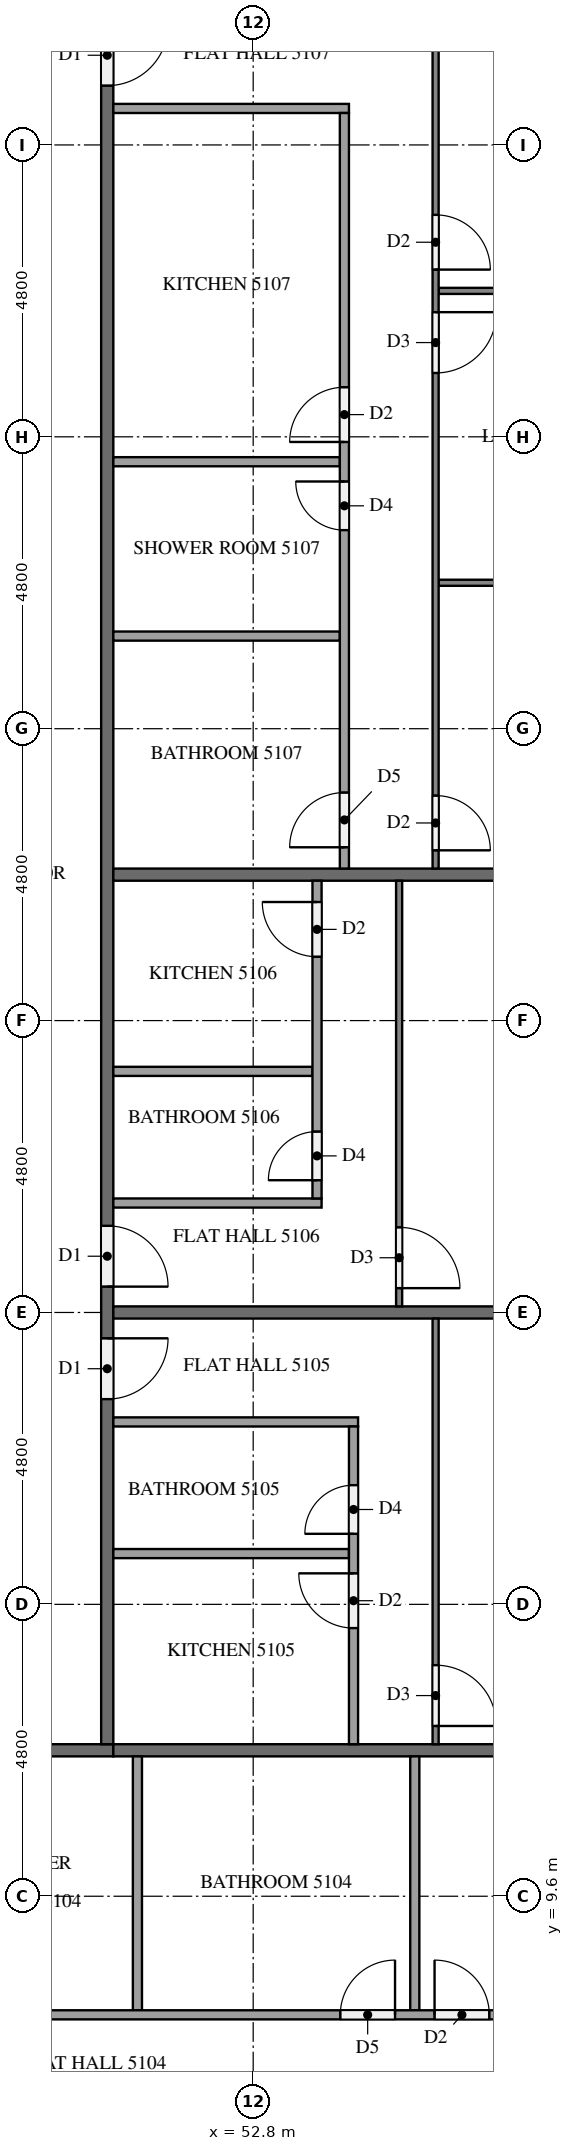
"""IFC4 building model, lengths in metres.
Left out: names, types, materials, properties, quantities, classifications, styles, units other than length and angle.
Written with IfcOpenShell. Run it as: python <this file> out.ifc"""

import sys

from ifc_helpers import new_model, si_unit, direction, frame, frame_2d, origin, place, context, subcontext, project, spatial, rectangle, extrude, element, fill, save


model = new_model("IFC4")
c1 = context("Model", 3, precision=1e-05, world=origin(), true_north=direction((0.0, 1.0)))
c2 = subcontext(c1, "Body", "Model", "MODEL_VIEW")
j1 = project(units=[si_unit("LENGTHUNIT", "METRE"), si_unit("PLANEANGLEUNIT", "RADIAN")], contexts=[c1])
p1 = place(None, origin())
s1 = spatial("IfcSite", under=j1, at=p1, CompositionType="ELEMENT")
p2 = place(p1, origin())
s2 = spatial("IfcBuilding", under=s1, at=p2, CompositionType="ELEMENT")
p3 = place(p2, frame((0.0, 0.0, 196.4)))
s3 = spatial("IfcBuildingStorey", under=s2, at=p3, CompositionType="ELEMENT", Elevation=196.4)
p4 = place(p3, frame((50.5, 12.0, 0.0), z_axis=(0.0, 0.0, 1.0), x_axis=(-1.0, 0.0, 0.0)))
e1 = element("IfcWall", 1, at=p4, inside=s3, PredefinedType="PARTITIONING", context=c2, shape_type="SweptSolid", body=[
    extrude(rectangle(XDim=38.6, YDim=0.2, at=frame_2d((19.3, 0.0))), origin(), (0.0, 0.0, 1.0), 3.2),
])
p5 = place(p4, frame((31.725, 0.0, 0.0)))
e2 = element("IfcOpeningElement", 2, at=p5, cuts=e1, PredefinedType="OPENING", context=c2, shape_type="SweptSolid", body=[
    extrude(rectangle(XDim=1.0, YDim=2.1, at=frame_2d((0.5, 1.05))), frame((0.0, 0.11, 0.0), z_axis=(0.0, -1.0, 0.0), x_axis=(1.0, 0.0, 0.0)), (0.0, 0.0, 1.0), 0.22),
])
p6 = place(p4, frame((19.725, 0.0, 0.0)))
e3 = element("IfcOpeningElement", 3, at=p6, cuts=e1, PredefinedType="OPENING", context=c2, shape_type="SweptSolid", body=[
    extrude(rectangle(XDim=1.0, YDim=2.1, at=frame_2d((0.5, 1.05))), frame((0.0, 0.11, 0.0), z_axis=(0.0, -1.0, 0.0), x_axis=(1.0, 0.0, 0.0)), (0.0, 0.0, 1.0), 0.22),
])
p7 = place(p4, frame((17.875, 0.0, 0.0)))
e4 = element("IfcOpeningElement", 4, at=p7, cuts=e1, PredefinedType="OPENING", context=c2, shape_type="SweptSolid", body=[
    extrude(rectangle(XDim=1.0, YDim=2.1, at=frame_2d((0.5, 1.05))), frame((0.0, 0.11, 0.0), z_axis=(0.0, -1.0, 0.0), x_axis=(1.0, 0.0, 0.0)), (0.0, 0.0, 1.0), 0.22),
])
p8 = place(p4, frame((3.475, 0.0, 0.0)))
e5 = element("IfcOpeningElement", 5, at=p8, cuts=e1, PredefinedType="OPENING", context=c2, shape_type="SweptSolid", body=[
    extrude(rectangle(XDim=1.0, YDim=2.1, at=frame_2d((0.5, 1.05))), frame((0.0, 0.11, 0.0), z_axis=(0.0, -1.0, 0.0), x_axis=(1.0, 0.0, 0.0)), (0.0, 0.0, 1.0), 0.22),
])
p9 = place(p3, frame((50.4, 40.7, 0.0), z_axis=(0.0, 0.0, 1.0), x_axis=(0.0, -1.0, 0.0)))
e6 = element("IfcWall", 6, at=p9, inside=s3, PredefinedType="PARTITIONING", context=c2, shape_type="SweptSolid", body=[
    extrude(rectangle(XDim=28.6, YDim=0.2, at=frame_2d((14.3, 0.0))), origin(), (0.0, 0.0, 1.0), 3.2),
])
p10 = place(p9, frame((21.925, 0.0, 0.0)))
e7 = element("IfcOpeningElement", 7, at=p10, cuts=e6, PredefinedType="OPENING", context=c2, shape_type="SweptSolid", body=[
    extrude(rectangle(XDim=1.0, YDim=2.1, at=frame_2d((0.5, 1.05))), frame((0.0, 0.11, 0.0), z_axis=(0.0, -1.0, 0.0), x_axis=(1.0, 0.0, 0.0)), (0.0, 0.0, 1.0), 0.22),
])
p11 = place(p9, frame((20.075, 0.0, 0.0)))
e8 = element("IfcOpeningElement", 8, at=p11, cuts=e6, PredefinedType="OPENING", context=c2, shape_type="SweptSolid", body=[
    extrude(rectangle(XDim=1.0, YDim=2.1, at=frame_2d((0.5, 1.05))), frame((0.0, 0.11, 0.0), z_axis=(0.0, -1.0, 0.0), x_axis=(1.0, 0.0, 0.0)), (0.0, 0.0, 1.0), 0.22),
])
p12 = place(p9, frame((0.325, 0.0, 0.0)))
e9 = element("IfcOpeningElement", 9, at=p12, cuts=e6, PredefinedType="OPENING", context=c2, shape_type="SweptSolid", body=[
    extrude(rectangle(XDim=1.0, YDim=2.1, at=frame_2d((0.5, 1.05))), frame((0.0, 0.11, 0.0), z_axis=(0.0, -1.0, 0.0), x_axis=(1.0, 0.0, 0.0)), (0.0, 0.0, 1.0), 0.22),
])
for number, where, z_axis, x_axis in (
    (10, (50.5, 12.0, 0.0), (0.0, 0.0, 1.0), (1.0, 0.0, 0.0)),
    (11, (50.5, 19.2, 0.0), (0.0, 0.0, 1.0), (1.0, 0.0, 0.0)),
    (12, (50.5, 26.4, 0.0), (0.0, 0.0, 1.0), (1.0, 0.0, 0.0)),
):
    element("IfcWall", number, at=place(p3, frame(where, z_axis=z_axis, x_axis=x_axis)), inside=s3, PredefinedType="PARTITIONING", context=c2, shape_type="SweptSolid", body=[
        extrude(rectangle(XDim=11.8, YDim=0.2, at=frame_2d((5.9, 0.0))), origin(), (0.0, 0.0, 1.0), 3.2),
    ])
for number, where, z_axis, x_axis in (
    (13, (50.896, 11.9, 0.0), (0.0, 0.0, 1.0), (0.0, -1.0, 0.0)),
    (14, (55.458, 11.9, 0.0), (0.0, 0.0, 1.0), (0.0, -1.0, 0.0)),
):
    element("IfcWall", number, at=place(p3, frame(where, z_axis=z_axis, x_axis=x_axis)), inside=s3, PredefinedType="PARTITIONING", context=c2, shape_type="SweptSolid", body=[
        extrude(rectangle(XDim=4.175, YDim=0.15, at=frame_2d((2.087, 0.0))), origin(), (0.0, 0.0, 1.0), 3.2),
    ])
p13 = place(p3, frame((47.475, 7.65, 0.0), z_axis=(0.0, 0.0, 1.0), x_axis=(1.0, 0.0, 0.0)))
e15 = element("IfcWall", 15, at=p13, inside=s3, PredefinedType="PARTITIONING", context=c2, shape_type="SweptSolid", body=[
    extrude(rectangle(XDim=14.825, YDim=0.15, at=frame_2d((7.413, 0.0))), origin(), (0.0, 0.0, 1.0), 3.2),
])
p14 = place(p13, frame((0.3, 0.0, 0.0)))
e16 = element("IfcOpeningElement", 16, at=p14, cuts=e15, PredefinedType="OPENING", context=c2, shape_type="SweptSolid", body=[
    extrude(rectangle(XDim=0.8, YDim=2.1, at=frame_2d((0.4, 1.05))), frame((0.0, 0.085, 0.0), z_axis=(0.0, -1.0, 0.0), x_axis=(1.0, 0.0, 0.0)), (0.0, 0.0, 1.0), 0.17),
])
p15 = place(p13, frame((6.758, 0.0, 0.0)))
e17 = element("IfcOpeningElement", 17, at=p15, cuts=e15, PredefinedType="OPENING", context=c2, shape_type="SweptSolid", body=[
    extrude(rectangle(XDim=0.9, YDim=2.1, at=frame_2d((0.45, 1.05))), frame((0.0, 0.085, 0.0), z_axis=(0.0, -1.0, 0.0), x_axis=(1.0, 0.0, 0.0)), (0.0, 0.0, 1.0), 0.17),
])
p16 = place(p13, frame((8.308, 0.0, 0.0)))
e18 = element("IfcOpeningElement", 18, at=p16, cuts=e15, PredefinedType="OPENING", context=c2, shape_type="SweptSolid", body=[
    extrude(rectangle(XDim=0.9, YDim=2.1, at=frame_2d((0.45, 1.05))), frame((0.0, 0.085, 0.0), z_axis=(0.0, -1.0, 0.0), x_axis=(1.0, 0.0, 0.0)), (0.0, 0.0, 1.0), 0.17),
])
p17 = place(p3, frame((55.8, 19.1, 0.0), z_axis=(0.0, 0.0, 1.0), x_axis=(0.0, -1.0, 0.0)))
e19 = element("IfcWall", 19, at=p17, inside=s3, PredefinedType="PARTITIONING", context=c2, shape_type="SweptSolid", body=[
    extrude(rectangle(XDim=7.0, YDim=0.1, at=frame_2d((3.5, 0.0))), origin(), (0.0, 0.0, 1.0), 3.2),
])
p18 = place(p17, frame((5.7, 0.0, 0.0)))
e20 = element("IfcOpeningElement", 20, at=p18, cuts=e19, PredefinedType="OPENING", context=c2, shape_type="SweptSolid", body=[
    extrude(rectangle(XDim=1.0, YDim=2.1, at=frame_2d((0.5, 1.05))), frame((0.0, 0.06, 0.0), z_axis=(0.0, -1.0, 0.0), x_axis=(1.0, 0.0, 0.0)), (0.0, 0.0, 1.0), 0.12),
])
p19 = place(p3, frame((50.5, 15.235, 0.0), z_axis=(0.0, 0.0, 1.0), x_axis=(1.0, 0.0, 0.0)))
e21 = element("IfcWall", 21, at=p19, inside=s3, PredefinedType="PARTITIONING", context=c2, shape_type="SweptSolid", body=[
    extrude(rectangle(XDim=3.875, YDim=0.15, at=frame_2d((1.938, 0.0))), origin(), (0.0, 0.0, 1.0), 3.2),
])
p20 = place(p3, frame((50.5, 17.4, 0.0), z_axis=(0.0, 0.0, 1.0), x_axis=(1.0, 0.0, 0.0)))
e22 = element("IfcWall", 22, at=p20, inside=s3, PredefinedType="PARTITIONING", context=c2, shape_type="SweptSolid", body=[
    extrude(rectangle(XDim=4.025, YDim=0.15, at=frame_2d((2.012, 0.0))), origin(), (0.0, 0.0, 1.0), 3.2),
])
p21 = place(p3, frame((54.45, 12.1, 0.0), z_axis=(0.0, 0.0, 1.0), x_axis=(0.0, 1.0, 0.0)))
e23 = element("IfcWall", 23, at=p21, inside=s3, PredefinedType="PARTITIONING", context=c2, shape_type="SweptSolid", body=[
    extrude(rectangle(XDim=5.225, YDim=0.15, at=frame_2d((2.612, 0.0))), origin(), (0.0, 0.0, 1.0), 3.2),
])
p22 = place(p21, frame((3.46, 0.0, 0.0)))
e24 = element("IfcOpeningElement", 24, at=p22, cuts=e23, PredefinedType="OPENING", context=c2, shape_type="SweptSolid", body=[
    extrude(rectangle(XDim=0.8, YDim=2.1, at=frame_2d((0.4, 1.05))), frame((0.0, 0.085, 0.0), z_axis=(0.0, -1.0, 0.0), x_axis=(1.0, 0.0, 0.0)), (0.0, 0.0, 1.0), 0.17),
])
p23 = place(p21, frame((1.91, 0.0, 0.0)))
e25 = element("IfcOpeningElement", 25, at=p23, cuts=e23, PredefinedType="OPENING", context=c2, shape_type="SweptSolid", body=[
    extrude(rectangle(XDim=0.9, YDim=2.1, at=frame_2d((0.45, 1.05))), frame((0.0, 0.085, 0.0), z_axis=(0.0, -1.0, 0.0), x_axis=(1.0, 0.0, 0.0)), (0.0, 0.0, 1.0), 0.17),
])
p24 = place(p3, frame((55.2, 26.3, 0.0), z_axis=(0.0, 0.0, 1.0), x_axis=(0.0, -1.0, 0.0)))
e26 = element("IfcWall", 26, at=p24, inside=s3, PredefinedType="PARTITIONING", context=c2, shape_type="SweptSolid", body=[
    extrude(rectangle(XDim=7.0, YDim=0.1, at=frame_2d((3.5, 0.0))), origin(), (0.0, 0.0, 1.0), 3.2),
])
p25 = place(p24, frame((5.7, 0.0, 0.0)))
e27 = element("IfcOpeningElement", 27, at=p25, cuts=e26, PredefinedType="OPENING", context=c2, shape_type="SweptSolid", body=[
    extrude(rectangle(XDim=1.0, YDim=2.1, at=frame_2d((0.5, 1.05))), frame((0.0, 0.06, 0.0), z_axis=(0.0, -1.0, 0.0), x_axis=(1.0, 0.0, 0.0)), (0.0, 0.0, 1.0), 0.12),
])
p26 = place(p3, frame((50.5, 23.165, 0.0), z_axis=(0.0, 0.0, 1.0), x_axis=(1.0, 0.0, 0.0)))
e28 = element("IfcWall", 28, at=p26, inside=s3, PredefinedType="PARTITIONING", context=c2, shape_type="SweptSolid", body=[
    extrude(rectangle(XDim=3.275, YDim=0.15, at=frame_2d((1.637, 0.0))), origin(), (0.0, 0.0, 1.0), 3.2),
])
p27 = place(p3, frame((50.5, 21.0, 0.0), z_axis=(0.0, 0.0, 1.0), x_axis=(1.0, 0.0, 0.0)))
e29 = element("IfcWall", 29, at=p27, inside=s3, PredefinedType="PARTITIONING", context=c2, shape_type="SweptSolid", body=[
    extrude(rectangle(XDim=3.425, YDim=0.15, at=frame_2d((1.712, 0.0))), origin(), (0.0, 0.0, 1.0), 3.2),
])
p28 = place(p3, frame((53.85, 21.075, 0.0), z_axis=(0.0, 0.0, 1.0), x_axis=(0.0, 1.0, 0.0)))
e30 = element("IfcWall", 30, at=p28, inside=s3, PredefinedType="PARTITIONING", context=c2, shape_type="SweptSolid", body=[
    extrude(rectangle(XDim=5.225, YDim=0.15, at=frame_2d((2.613, 0.0))), origin(), (0.0, 0.0, 1.0), 3.2),
])
p29 = place(p28, frame((0.3, 0.0, 0.0)))
e31 = element("IfcOpeningElement", 31, at=p29, cuts=e30, PredefinedType="OPENING", context=c2, shape_type="SweptSolid", body=[
    extrude(rectangle(XDim=0.8, YDim=2.1, at=frame_2d((0.4, 1.05))), frame((0.0, 0.085, 0.0), z_axis=(0.0, -1.0, 0.0), x_axis=(1.0, 0.0, 0.0)), (0.0, 0.0, 1.0), 0.17),
])
p30 = place(p28, frame((3.975, 0.0, 0.0)))
e32 = element("IfcOpeningElement", 32, at=p30, cuts=e30, PredefinedType="OPENING", context=c2, shape_type="SweptSolid", body=[
    extrude(rectangle(XDim=0.9, YDim=2.1, at=frame_2d((0.45, 1.05))), frame((0.0, 0.085, 0.0), z_axis=(0.0, -1.0, 0.0), x_axis=(1.0, 0.0, 0.0)), (0.0, 0.0, 1.0), 0.17),
])
for number, where, z_axis, x_axis in (
    (33, (55.85, 36.0, 0.0), (0.0, 0.0, 1.0), (1.0, 0.0, 0.0)),
    (34, (55.85, 31.2, 0.0), (0.0, 0.0, 1.0), (1.0, 0.0, 0.0)),
):
    element("IfcWall", number, at=place(p3, frame(where, z_axis=z_axis, x_axis=x_axis)), inside=s3, PredefinedType="PARTITIONING", context=c2, shape_type="SweptSolid", body=[
        extrude(rectangle(XDim=6.45, YDim=0.1, at=frame_2d((3.225, 0.0))), origin(), (0.0, 0.0, 1.0), 3.2),
    ])
p31 = place(p3, frame((55.8, 40.7, 0.0), z_axis=(0.0, 0.0, 1.0), x_axis=(0.0, -1.0, 0.0)))
e35 = element("IfcWall", 35, at=p31, inside=s3, PredefinedType="PARTITIONING", context=c2, shape_type="SweptSolid", body=[
    extrude(rectangle(XDim=14.2, YDim=0.1, at=frame_2d((7.1, 0.0))), origin(), (0.0, 0.0, 1.0), 3.2),
])
p32 = place(p31, frame((3.45, 0.0, 0.0)))
e36 = element("IfcOpeningElement", 36, at=p32, cuts=e35, PredefinedType="OPENING", context=c2, shape_type="SweptSolid", body=[
    extrude(rectangle(XDim=0.9, YDim=2.1, at=frame_2d((0.45, 1.05))), frame((0.0, 0.06, 0.0), z_axis=(0.0, -1.0, 0.0), x_axis=(1.0, 0.0, 0.0)), (0.0, 0.0, 1.0), 0.12),
])
p33 = place(p31, frame((5.05, 0.0, 0.0)))
e37 = element("IfcOpeningElement", 37, at=p33, cuts=e35, PredefinedType="OPENING", context=c2, shape_type="SweptSolid", body=[
    extrude(rectangle(XDim=1.0, YDim=2.1, at=frame_2d((0.5, 1.05))), frame((0.0, 0.06, 0.0), z_axis=(0.0, -1.0, 0.0), x_axis=(1.0, 0.0, 0.0)), (0.0, 0.0, 1.0), 0.12),
])
p34 = place(p31, frame((13.0, 0.0, 0.0)))
e38 = element("IfcOpeningElement", 38, at=p34, cuts=e35, PredefinedType="OPENING", context=c2, shape_type="SweptSolid", body=[
    extrude(rectangle(XDim=0.9, YDim=2.1, at=frame_2d((0.45, 1.05))), frame((0.0, 0.06, 0.0), z_axis=(0.0, -1.0, 0.0), x_axis=(1.0, 0.0, 0.0)), (0.0, 0.0, 1.0), 0.12),
])
for number, where, z_axis, x_axis in (
    (39, (50.5, 33.19, 0.0), (0.0, 0.0, 1.0), (1.0, 0.0, 0.0)),
    (40, (50.5, 30.323, 0.0), (0.0, 0.0, 1.0), (1.0, 0.0, 0.0)),
):
    element("IfcWall", number, at=place(p3, frame(where, z_axis=z_axis, x_axis=x_axis)), inside=s3, PredefinedType="PARTITIONING", context=c2, shape_type="SweptSolid", body=[
        extrude(rectangle(XDim=3.725, YDim=0.15, at=frame_2d((1.863, 0.0))), origin(), (0.0, 0.0, 1.0), 3.2),
    ])
p35 = place(p3, frame((50.5, 39.0, 0.0), z_axis=(0.0, 0.0, 1.0), x_axis=(1.0, 0.0, 0.0)))
e41 = element("IfcWall", 41, at=p35, inside=s3, PredefinedType="PARTITIONING", context=c2, shape_type="SweptSolid", body=[
    extrude(rectangle(XDim=3.875, YDim=0.15, at=frame_2d((1.938, 0.0))), origin(), (0.0, 0.0, 1.0), 3.2),
])
p36 = place(p3, frame((54.3, 26.5, 0.0), z_axis=(0.0, 0.0, 1.0), x_axis=(0.0, 1.0, 0.0)))
e42 = element("IfcWall", 42, at=p36, inside=s3, PredefinedType="PARTITIONING", context=c2, shape_type="SweptSolid", body=[
    extrude(rectangle(XDim=12.425, YDim=0.15, at=frame_2d((6.212, 0.0))), origin(), (0.0, 0.0, 1.0), 3.2),
])
p37 = place(p36, frame((7.015, 0.0, 0.0)))
e43 = element("IfcOpeningElement", 43, at=p37, cuts=e42, PredefinedType="OPENING", context=c2, shape_type="SweptSolid", body=[
    extrude(rectangle(XDim=0.9, YDim=2.1, at=frame_2d((0.45, 1.05))), frame((0.0, 0.085, 0.0), z_axis=(0.0, -1.0, 0.0), x_axis=(1.0, 0.0, 0.0)), (0.0, 0.0, 1.0), 0.17),
])
p38 = place(p36, frame((5.565, 0.0, 0.0)))
e44 = element("IfcOpeningElement", 44, at=p38, cuts=e42, PredefinedType="OPENING", context=c2, shape_type="SweptSolid", body=[
    extrude(rectangle(XDim=0.8, YDim=2.1, at=frame_2d((0.4, 1.05))), frame((0.0, 0.085, 0.0), z_axis=(0.0, -1.0, 0.0), x_axis=(1.0, 0.0, 0.0)), (0.0, 0.0, 1.0), 0.17),
])
p39 = place(p36, frame((0.35, 0.0, 0.0)))
e45 = element("IfcOpeningElement", 45, at=p39, cuts=e42, PredefinedType="OPENING", context=c2, shape_type="SweptSolid", body=[
    extrude(rectangle(XDim=0.9, YDim=2.1, at=frame_2d((0.45, 1.05))), frame((0.0, 0.085, 0.0), z_axis=(0.0, -1.0, 0.0), x_axis=(1.0, 0.0, 0.0)), (0.0, 0.0, 1.0), 0.17),
])
p40 = place(p10, origin())
e46 = element("IfcDoor", 46, at=p40, inside=s3, OperationType="SINGLE_SWING_LEFT", PredefinedType="DOOR", context=c2, shape_type="SweptSolid", body=[
    extrude(rectangle(XDim=1.0, YDim=2.1, at=frame_2d((0.5, 1.05))), frame((0.0, 0.025, 0.0), z_axis=(0.0, -1.0, 0.0), x_axis=(1.0, 0.0, 0.0)), (0.0, 0.0, 1.0), 0.05),
])
fill(e7, e46)
p41 = place(p11, origin())
e47 = element("IfcDoor", 47, at=p41, inside=s3, OperationType="SINGLE_SWING_RIGHT", PredefinedType="DOOR", context=c2, shape_type="SweptSolid", body=[
    extrude(rectangle(XDim=1.0, YDim=2.1, at=frame_2d((0.5, 1.05))), frame((0.0, 0.025, 0.0), z_axis=(0.0, -1.0, 0.0), x_axis=(1.0, 0.0, 0.0)), (0.0, 0.0, 1.0), 0.05),
])
fill(e8, e47)
p42 = place(p12, origin())
e48 = element("IfcDoor", 48, at=p42, inside=s3, OperationType="SINGLE_SWING_LEFT", PredefinedType="DOOR", context=c2, shape_type="SweptSolid", body=[
    extrude(rectangle(XDim=1.0, YDim=2.1, at=frame_2d((0.5, 1.05))), frame((0.0, 0.025, 0.0), z_axis=(0.0, -1.0, 0.0), x_axis=(1.0, 0.0, 0.0)), (0.0, 0.0, 1.0), 0.05),
])
fill(e9, e48)
p43 = place(p15, origin())
e49 = element("IfcDoor", 49, at=p43, inside=s3, OperationType="SINGLE_SWING_RIGHT", PredefinedType="DOOR", context=c2, shape_type="SweptSolid", body=[
    extrude(rectangle(XDim=0.9, YDim=2.1, at=frame_2d((0.45, 1.05))), frame((0.0, 0.025, 0.0), z_axis=(0.0, -1.0, 0.0), x_axis=(1.0, 0.0, 0.0)), (0.0, 0.0, 1.0), 0.05),
])
fill(e17, e49)
p44 = place(p16, origin())
e50 = element("IfcDoor", 50, at=p44, inside=s3, OperationType="SINGLE_SWING_LEFT", PredefinedType="DOOR", context=c2, shape_type="SweptSolid", body=[
    extrude(rectangle(XDim=0.9, YDim=2.1, at=frame_2d((0.45, 1.05))), frame((0.0, 0.025, 0.0), z_axis=(0.0, -1.0, 0.0), x_axis=(1.0, 0.0, 0.0)), (0.0, 0.0, 1.0), 0.05),
])
fill(e18, e50)
p45 = place(p18, origin())
e51 = element("IfcDoor", 51, at=p45, inside=s3, OperationType="SINGLE_SWING_RIGHT", PredefinedType="DOOR", context=c2, shape_type="SweptSolid", body=[
    extrude(rectangle(XDim=1.0, YDim=2.1, at=frame_2d((0.5, 1.05))), frame((0.0, 0.025, 0.0), z_axis=(0.0, -1.0, 0.0), x_axis=(1.0, 0.0, 0.0)), (0.0, 0.0, 1.0), 0.05),
])
fill(e20, e51)
p46 = place(p22, origin())
e52 = element("IfcDoor", 52, at=p46, inside=s3, OperationType="SINGLE_SWING_LEFT", PredefinedType="DOOR", context=c2, shape_type="SweptSolid", body=[
    extrude(rectangle(XDim=0.8, YDim=2.1, at=frame_2d((0.4, 1.05))), frame((0.0, 0.025, 0.0), z_axis=(0.0, -1.0, 0.0), x_axis=(1.0, 0.0, 0.0)), (0.0, 0.0, 1.0), 0.05),
])
fill(e24, e52)
p47 = place(p23, origin())
e53 = element("IfcDoor", 53, at=p47, inside=s3, OperationType="SINGLE_SWING_RIGHT", PredefinedType="DOOR", context=c2, shape_type="SweptSolid", body=[
    extrude(rectangle(XDim=0.9, YDim=2.1, at=frame_2d((0.45, 1.05))), frame((0.0, 0.025, 0.0), z_axis=(0.0, -1.0, 0.0), x_axis=(1.0, 0.0, 0.0)), (0.0, 0.0, 1.0), 0.05),
])
fill(e25, e53)
p48 = place(p25, origin())
e54 = element("IfcDoor", 54, at=p48, inside=s3, OperationType="SINGLE_SWING_RIGHT", PredefinedType="DOOR", context=c2, shape_type="SweptSolid", body=[
    extrude(rectangle(XDim=1.0, YDim=2.1, at=frame_2d((0.5, 1.05))), frame((0.0, 0.025, 0.0), z_axis=(0.0, -1.0, 0.0), x_axis=(1.0, 0.0, 0.0)), (0.0, 0.0, 1.0), 0.05),
])
fill(e27, e54)
p49 = place(p29, origin())
e55 = element("IfcDoor", 55, at=p49, inside=s3, OperationType="SINGLE_SWING_LEFT", PredefinedType="DOOR", context=c2, shape_type="SweptSolid", body=[
    extrude(rectangle(XDim=0.8, YDim=2.1, at=frame_2d((0.4, 1.05))), frame((0.0, 0.025, 0.0), z_axis=(0.0, -1.0, 0.0), x_axis=(1.0, 0.0, 0.0)), (0.0, 0.0, 1.0), 0.05),
])
fill(e31, e55)
p50 = place(p30, origin())
e56 = element("IfcDoor", 56, at=p50, inside=s3, OperationType="SINGLE_SWING_RIGHT", PredefinedType="DOOR", context=c2, shape_type="SweptSolid", body=[
    extrude(rectangle(XDim=0.9, YDim=2.1, at=frame_2d((0.45, 1.05))), frame((0.0, 0.025, 0.0), z_axis=(0.0, -1.0, 0.0), x_axis=(1.0, 0.0, 0.0)), (0.0, 0.0, 1.0), 0.05),
])
fill(e32, e56)
p51 = place(p32, origin())
e57 = element("IfcDoor", 57, at=p51, inside=s3, OperationType="SINGLE_SWING_RIGHT", PredefinedType="DOOR", context=c2, shape_type="SweptSolid", body=[
    extrude(rectangle(XDim=0.9, YDim=2.1, at=frame_2d((0.45, 1.05))), frame((0.0, 0.025, 0.0), z_axis=(0.0, -1.0, 0.0), x_axis=(1.0, 0.0, 0.0)), (0.0, 0.0, 1.0), 0.05),
])
fill(e36, e57)
p52 = place(p33, origin())
e58 = element("IfcDoor", 58, at=p52, inside=s3, OperationType="SINGLE_SWING_LEFT", PredefinedType="DOOR", context=c2, shape_type="SweptSolid", body=[
    extrude(rectangle(XDim=1.0, YDim=2.1, at=frame_2d((0.5, 1.05))), frame((0.0, 0.025, 0.0), z_axis=(0.0, -1.0, 0.0), x_axis=(1.0, 0.0, 0.0)), (0.0, 0.0, 1.0), 0.05),
])
fill(e37, e58)
p53 = place(p34, origin())
e59 = element("IfcDoor", 59, at=p53, inside=s3, OperationType="SINGLE_SWING_RIGHT", PredefinedType="DOOR", context=c2, shape_type="SweptSolid", body=[
    extrude(rectangle(XDim=0.9, YDim=2.1, at=frame_2d((0.45, 1.05))), frame((0.0, 0.025, 0.0), z_axis=(0.0, -1.0, 0.0), x_axis=(1.0, 0.0, 0.0)), (0.0, 0.0, 1.0), 0.05),
])
fill(e38, e59)
p54 = place(p37, origin())
e60 = element("IfcDoor", 60, at=p54, inside=s3, OperationType="SINGLE_SWING_LEFT", PredefinedType="DOOR", context=c2, shape_type="SweptSolid", body=[
    extrude(rectangle(XDim=0.9, YDim=2.1, at=frame_2d((0.45, 1.05))), frame((0.0, 0.025, 0.0), z_axis=(0.0, -1.0, 0.0), x_axis=(1.0, 0.0, 0.0)), (0.0, 0.0, 1.0), 0.05),
])
fill(e43, e60)
p55 = place(p38, origin())
e61 = element("IfcDoor", 61, at=p55, inside=s3, OperationType="SINGLE_SWING_RIGHT", PredefinedType="DOOR", context=c2, shape_type="SweptSolid", body=[
    extrude(rectangle(XDim=0.8, YDim=2.1, at=frame_2d((0.4, 1.05))), frame((0.0, 0.025, 0.0), z_axis=(0.0, -1.0, 0.0), x_axis=(1.0, 0.0, 0.0)), (0.0, 0.0, 1.0), 0.05),
])
fill(e44, e61)
p56 = place(p39, origin())
e62 = element("IfcDoor", 62, at=p56, inside=s3, OperationType="SINGLE_SWING_LEFT", PredefinedType="DOOR", context=c2, shape_type="SweptSolid", body=[
    extrude(rectangle(XDim=0.9, YDim=2.1, at=frame_2d((0.45, 1.05))), frame((0.0, 0.025, 0.0), z_axis=(0.0, -1.0, 0.0), x_axis=(1.0, 0.0, 0.0)), (0.0, 0.0, 1.0), 0.05),
])
fill(e45, e62)
save(model, sys.argv[1])
